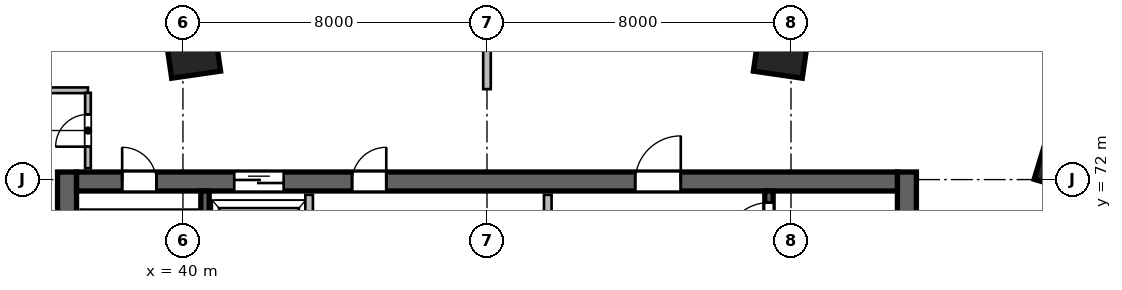
"""IFC4 building model, lengths in metres.
Left out: names, types, materials, properties, quantities, classifications, styles, units other than length and angle.
Written with IfcOpenShell. Run it as: python <this file> out.ifc"""

import sys

from ifc_helpers import new_model, si_unit, direction, frame, frame_2d, origin, origin_2d, place, context, subcontext, project, spatial, rectangle, extrude, source, transform, mapped, element, fill, save


model = new_model("IFC4")
c1 = context("Model", 3, precision=1e-05, world=origin(), true_north=direction((0.0, 1.0)))
c2 = subcontext(c1, "Body", "Model", "MODEL_VIEW")
j1 = project(units=[si_unit("LENGTHUNIT", "METRE"), si_unit("PLANEANGLEUNIT", "RADIAN")], contexts=[c1])
p1 = place(None, origin())
s1 = spatial("IfcSite", under=j1, at=p1, CompositionType="ELEMENT")
p2 = place(p1, origin())
s2 = spatial("IfcBuilding", under=s1, at=p2, CompositionType="ELEMENT")
p3 = place(p2, frame((0.0, 0.0, 85.8)))
s3 = spatial("IfcBuildingStorey", under=s2, at=p3, CompositionType="ELEMENT", Elevation=85.8)
m1 = source(origin(), c2, "Body", "SweptSolid", [
    extrude(rectangle(XDim=12.0, YDim=0.5, at=frame_2d((6.0, 0.0))), origin(), (0.0, 0.0, 1.0), 5.4),
])
for number, where, z_axis, x_axis in (
    (1, (36.95, 60.2, 0.0), (0.0, 0.0, 1.0), (0.0, 1.0, 0.0)),
    (2, (59.05, 60.2, 0.0), (0.0, 0.0, 1.0), (0.0, 1.0, 0.0)),
):
    element("IfcWall", number, at=place(p3, frame(where, z_axis=z_axis, x_axis=x_axis)), inside=s3, PredefinedType="SHEAR", context=c2, shape_type="MappedRepresentation", body=[
        mapped(m1, transform((0.0, 0.0, 0.0), scale=1.0)),
    ])
m2 = source(origin(), c2, "Body", "SweptSolid", [
    extrude(rectangle(XDim=21.6, YDim=0.5, at=frame_2d((10.8, 0.0))), origin(), (0.0, 0.0, 1.0), 5.4),
])
p4 = place(p3, frame((37.2, 71.95, 0.0), z_axis=(0.0, 0.0, 1.0), x_axis=(1.0, 0.0, 0.0)))
e3 = element("IfcWall", 3, at=p4, inside=s3, PredefinedType="SHEAR", context=c2, shape_type="MappedRepresentation", body=[
    mapped(m2, transform((0.0, 0.0, 0.0), scale=1.0)),
])
p5 = place(p4, frame((1.2, 0.0, 0.0)))
e4 = element("IfcOpeningElement", 4, at=p5, cuts=e3, PredefinedType="OPENING", context=c2, shape_type="SweptSolid", body=[
    extrude(rectangle(XDim=0.9, YDim=2.1, at=frame_2d((0.45, 1.05))), frame((0.0, 0.26, 0.0), z_axis=(0.0, -1.0, 0.0), x_axis=(1.0, 0.0, 0.0)), (0.0, 0.0, 1.0), 0.52),
])
p6 = place(p4, frame((14.7, 0.0, 0.0)))
e5 = element("IfcOpeningElement", 5, at=p6, cuts=e3, PredefinedType="OPENING", context=c2, shape_type="SweptSolid", body=[
    extrude(rectangle(XDim=1.2, YDim=2.15, at=frame_2d((0.6, 1.075))), frame((0.0, 0.26, 0.0), z_axis=(0.0, -1.0, 0.0), x_axis=(1.0, 0.0, 0.0)), (0.0, 0.0, 1.0), 0.52),
])
p7 = place(p4, frame((4.15, 0.0, 0.0)))
e6 = element("IfcOpeningElement", 6, at=p7, cuts=e3, PredefinedType="OPENING", context=c2, shape_type="SweptSolid", body=[
    extrude(rectangle(XDim=1.3, YDim=2.15, at=frame_2d((0.65, 1.075))), frame((0.0, 0.26, 0.0), z_axis=(0.0, -1.0, 0.0), x_axis=(1.0, 0.0, 0.0)), (0.0, 0.0, 1.0), 0.52),
])
p8 = place(p4, frame((7.25, 0.0, 0.0)))
e7 = element("IfcOpeningElement", 7, at=p8, cuts=e3, PredefinedType="OPENING", context=c2, shape_type="SweptSolid", body=[
    extrude(rectangle(XDim=0.9, YDim=2.1, at=frame_2d((0.45, 1.05))), frame((0.0, 0.26, 0.0), z_axis=(0.0, -1.0, 0.0), x_axis=(1.0, 0.0, 0.0)), (0.0, 0.0, 1.0), 0.52),
])
m3 = source(origin(), c2, "Body", "SweptSolid", [
    extrude(rectangle(XDim=11.0, YDim=0.22, at=frame_2d((5.5, 0.0))), origin(), (0.0, 0.0, 1.0), 5.4),
])
p9 = place(p3, frame((40.58, 60.7, 0.0), z_axis=(0.0, 0.0, 1.0), x_axis=(0.0, 1.0, 0.0)))
e8 = element("IfcWall", 8, at=p9, inside=s3, PredefinedType="SHEAR", context=c2, shape_type="MappedRepresentation", body=[
    mapped(m3, transform((0.0, 0.0, 0.0), scale=1.0)),
])
p10 = place(p3, frame((55.42, 60.7, 0.0), z_axis=(0.0, 0.0, 1.0), x_axis=(0.0, 1.0, 0.0)))
e9 = element("IfcWall", 9, at=p10, inside=s3, PredefinedType="SHEAR", context=c2, shape_type="MappedRepresentation", body=[
    mapped(m3, transform((0.0, 0.0, 0.0), scale=1.0)),
])
p11 = place(p10, frame((9.545, 0.0, 0.0)))
e10 = element("IfcOpeningElement", 10, at=p11, cuts=e9, PredefinedType="OPENING", context=c2, shape_type="SweptSolid", body=[
    extrude(rectangle(XDim=1.15, YDim=2.15, at=frame_2d((0.575, 1.075))), frame((0.0, 0.12, 0.0), z_axis=(0.0, -1.0, 0.0), x_axis=(1.0, 0.0, 0.0)), (0.0, 0.0, 1.0), 0.24),
])
m4 = source(origin(), c2, "Body", "SweptSolid", [
    extrude(rectangle(XDim=1.3, YDim=1.3, at=origin_2d()), origin(), (0.0, 0.0, 1.0), 5.4),
])
for number, where, z_axis, x_axis in (
    (11, (40.253, 75.404, 0.0), (0.0, 0.0, 1.0), (-0.143, 0.99, 0.0)),
    (12, (55.747, 75.404, 0.0), (0.0, 0.0, 1.0), (0.143, 0.99, 0.0)),
    (13, (63.209, 72.442, 0.0), (0.0, 0.0, 1.0), (0.289, 0.957, 0.0)),
):
    element("IfcColumn", number, at=place(p3, frame(where, z_axis=z_axis, x_axis=x_axis)), inside=s3, PredefinedType="COLUMN", context=c2, shape_type="MappedRepresentation", body=[
        mapped(m4, transform((0.0, 0.0, 0.0), scale=1.0)),
    ])
m5 = source(origin(), c2, "Body", "SweptSolid", [
    extrude(rectangle(XDim=4.553, YDim=0.3, at=frame_2d((2.277, 0.0))), origin(), (0.0, 0.0, 1.0), 5.15),
])
p12 = place(p3, frame((60.849, 77.073, 0.0), z_axis=(0.0, 0.0, 1.0), x_axis=(0.895976648497, -0.444101165669, 0.0)))
e14 = element("IfcWall", 14, at=p12, inside=s3, PredefinedType="SOLIDWALL", context=c2, shape_type="MappedRepresentation", body=[
    mapped(m5, transform((0.0, 0.0, 0.0), scale=1.0)),
])
m6 = source(origin(), c2, "Body", "SweptSolid", [
    extrude(rectangle(XDim=5.8, YDim=0.2, at=frame_2d((2.9, 0.0))), origin(), (0.0, 0.0, 1.0), 5.15),
])
p13 = place(p3, frame((49.6, 65.8, 0.0), z_axis=(0.0, 0.0, 1.0), x_axis=(0.0, 1.0, 0.0)))
e15 = element("IfcWall", 15, at=p13, inside=s3, PredefinedType="SOLIDWALL", context=c2, shape_type="MappedRepresentation", body=[
    mapped(m6, transform((0.0, 0.0, 0.0), scale=1.0)),
])
m7 = source(origin(), c2, "Body", "SweptSolid", [
    extrude(rectangle(XDim=3.2, YDim=0.2, at=frame_2d((1.6, 0.0))), origin(), (0.0, 0.0, 1.0), 5.15),
])
p14 = place(p3, frame((43.32, 68.4, 0.0), z_axis=(0.0, 0.0, 1.0), x_axis=(0.0, 1.0, 0.0)))
e16 = element("IfcWall", 16, at=p14, inside=s3, PredefinedType="SOLIDWALL", context=c2, shape_type="MappedRepresentation", body=[
    mapped(m7, transform((0.0, 0.0, 0.0), scale=1.0)),
])
m8 = source(origin(), c2, "Body", "SweptSolid", [
    extrude(rectangle(XDim=3.1, YDim=0.15, at=frame_2d((1.55, 0.0))), origin(), (0.0, 0.0, 1.0), 2.425),
])
p15 = place(p3, frame((34.4, 74.35, 0.0), z_axis=(0.0, 0.0, 1.0), x_axis=(1.0, 0.0, 0.0)))
e17 = element("IfcWall", 17, at=p15, inside=s3, PredefinedType="PARTITIONING", context=c2, shape_type="MappedRepresentation", body=[
    mapped(m8, transform((0.0, 0.0, 0.0), scale=1.0)),
])
m9 = source(origin(), c2, "Body", "SweptSolid", [
    extrude(rectangle(XDim=1.982, YDim=0.15, at=frame_2d((0.991, 0.0))), origin(), (0.0, 0.0, 1.0), 5.15),
])
p16 = place(p3, frame((37.5, 72.3, 0.0), z_axis=(0.0, 0.0, 1.0), x_axis=(0.0, 1.0, 0.0)))
e18 = element("IfcWall", 18, at=p16, inside=s3, PredefinedType="PARTITIONING", context=c2, shape_type="MappedRepresentation", body=[
    mapped(m9, transform((0.0, 0.0, 0.0), scale=1.0)),
])
p17 = place(p16, frame((0.566, 0.0, 0.0)))
e19 = element("IfcOpeningElement", 19, at=p17, cuts=e18, PredefinedType="OPENING", context=c2, shape_type="SweptSolid", body=[
    extrude(rectangle(XDim=0.85, YDim=2.1, at=frame_2d((0.425, 1.05))), frame((0.0, 0.085, 0.0), z_axis=(0.0, -1.0, 0.0), x_axis=(1.0, 0.0, 0.0)), (0.0, 0.0, 1.0), 0.17),
])
m10 = source(origin(), c2, "Body", "SweptSolid", [
    extrude(rectangle(XDim=5.318, YDim=0.2, at=frame_2d((2.659, 0.0))), origin(), (0.0, 0.0, 1.0), 4.434),
])
p18 = place(p3, frame((48.0, 74.38, 0.0), z_axis=(0.0, 0.0, 1.0), x_axis=(0.0, 1.0, 0.0)))
e20 = element("IfcWall", 20, at=p18, inside=s3, PredefinedType="SOLIDWALL", context=c2, shape_type="MappedRepresentation", body=[
    mapped(m10, transform((0.0, 0.0, 0.0), scale=1.0)),
])
m11 = source(origin(), c2, "Body", "SweptSolid", [
    extrude(rectangle(XDim=0.9, YDim=2.1, at=frame_2d((0.45, 1.05))), frame((0.0, 0.025, 0.0), z_axis=(0.0, -1.0, 0.0), x_axis=(1.0, 0.0, 0.0)), (0.0, 0.0, 1.0), 0.05),
])
p19 = place(p5, origin())
e21 = element("IfcDoor", 21, at=p19, inside=s3, OperationType="SINGLE_SWING_LEFT", PredefinedType="DOOR", context=c2, shape_type="MappedRepresentation", body=[
    mapped(m11, transform((0.0, 0.0, 0.0), scale=1.0)),
])
fill(e4, e21)
m12 = source(origin(), c2, "Body", "SweptSolid", [
    extrude(rectangle(XDim=1.15, YDim=2.15, at=frame_2d((0.575, 1.075))), frame((0.0, 0.025, 0.0), z_axis=(0.0, -1.0, 0.0), x_axis=(1.0, 0.0, 0.0)), (0.0, 0.0, 1.0), 0.05),
])
p20 = place(p11, origin())
e22 = element("IfcDoor", 22, at=p20, inside=s3, OperationType="SINGLE_SWING_LEFT", PredefinedType="DOOR", context=c2, shape_type="MappedRepresentation", body=[
    mapped(m12, transform((0.0, 0.0, 0.0), scale=1.0)),
])
fill(e10, e22)
m13 = source(origin(), c2, "Body", "SweptSolid", [
    extrude(rectangle(XDim=1.2, YDim=2.15, at=frame_2d((0.6, 1.075))), frame((0.0, 0.025, 0.0), z_axis=(0.0, -1.0, 0.0), x_axis=(1.0, 0.0, 0.0)), (0.0, 0.0, 1.0), 0.05),
])
p21 = place(p6, origin())
e23 = element("IfcDoor", 23, at=p21, inside=s3, OperationType="SINGLE_SWING_RIGHT", PredefinedType="DOOR", context=c2, shape_type="MappedRepresentation", body=[
    mapped(m13, transform((0.0, 0.0, 0.0), scale=1.0)),
])
fill(e5, e23)
m14 = source(origin(), c2, "Body", "SweptSolid", [
    extrude(rectangle(XDim=1.3, YDim=2.15, at=frame_2d((0.65, 1.075))), frame((0.0, 0.025, 0.0), z_axis=(0.0, -1.0, 0.0), x_axis=(1.0, 0.0, 0.0)), (0.0, 0.0, 1.0), 0.05),
])
p22 = place(p7, origin())
e24 = element("IfcDoor", 24, at=p22, inside=s3, OperationType="DOUBLE_DOOR_SLIDING", PredefinedType="DOOR", context=c2, shape_type="MappedRepresentation", body=[
    mapped(m14, transform((0.0, 0.0, 0.0), scale=1.0)),
])
fill(e6, e24)
p23 = place(p8, origin())
e25 = element("IfcDoor", 25, at=p23, inside=s3, OperationType="SINGLE_SWING_RIGHT", PredefinedType="DOOR", context=c2, shape_type="MappedRepresentation", body=[
    mapped(m11, transform((0.0, 0.0, 0.0), scale=1.0)),
])
fill(e7, e25)
m15 = source(origin(), c2, "Body", "SweptSolid", [
    extrude(rectangle(XDim=0.85, YDim=2.1, at=frame_2d((0.425, 1.05))), frame((0.0, 0.025, 0.0), z_axis=(0.0, -1.0, 0.0), x_axis=(1.0, 0.0, 0.0)), (0.0, 0.0, 1.0), 0.05),
])
p24 = place(p17, origin())
e26 = element("IfcDoor", 26, at=p24, inside=s3, OperationType="SINGLE_SWING_LEFT", PredefinedType="DOOR", context=c2, shape_type="MappedRepresentation", body=[
    mapped(m15, transform((0.0, 0.0, 0.0), scale=1.0)),
])
fill(e19, e26)
save(model, sys.argv[1])
